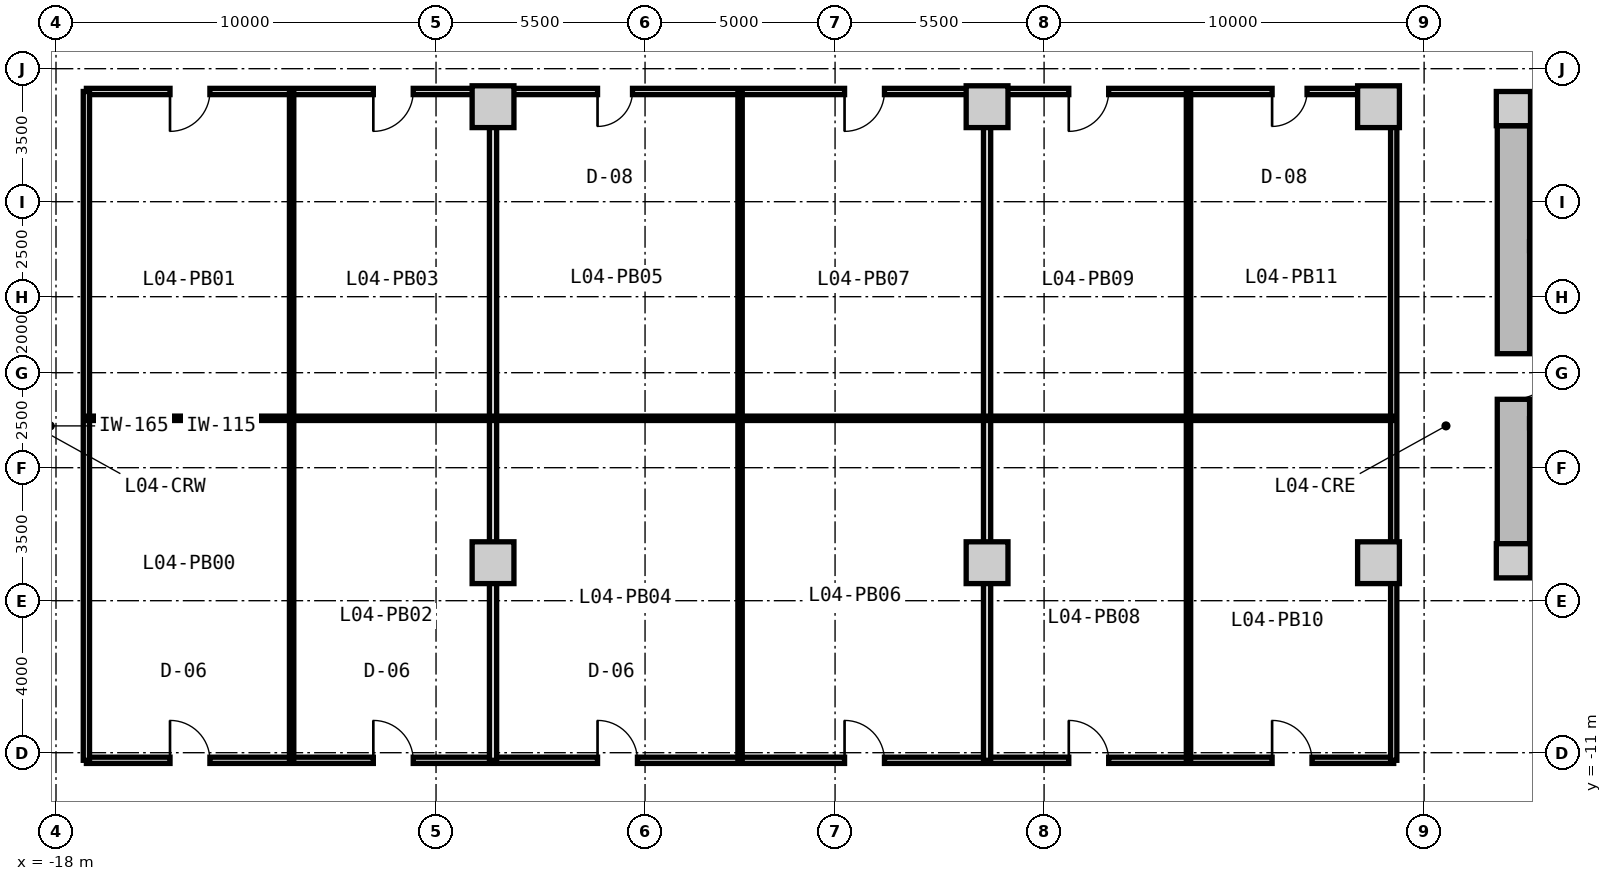
"""IFC4 building model, lengths in metres.
Left out: names, types, materials, properties, quantities, classifications, styles, units other than length and angle.
Written with IfcOpenShell. Run it as: python <this file> out.ifc"""

import sys

from ifc_helpers import new_model, si_unit, direction, frame, frame_2d, origin, origin_2d, place, context, subcontext, project, spatial, rectangle, extrude, source, transform, mapped, element, fill, save


model = new_model("IFC4")
c1 = context("Model", 3, precision=1e-05, world=origin(), true_north=direction((0.0, 1.0)))
c2 = subcontext(c1, "Body", "Model", "MODEL_VIEW")
j1 = project(units=[si_unit("LENGTHUNIT", "METRE"), si_unit("PLANEANGLEUNIT", "RADIAN")], contexts=[c1])
p1 = place(None, origin())
s1 = spatial("IfcSite", under=j1, at=p1, CompositionType="ELEMENT")
p2 = place(p1, origin())
s2 = spatial("IfcBuilding", under=s1, at=p2, CompositionType="ELEMENT")
p3 = place(p2, frame((0.0, 0.0, 16.8)))
s3 = spatial("IfcBuildingStorey", under=s2, at=p3, CompositionType="ELEMENT", Elevation=16.8)
m1 = source(origin(), c2, "Body", "SweptSolid", [
    extrude(rectangle(XDim=0.9, YDim=0.9, at=origin_2d()), origin(), (0.0, 0.0, 1.0), 4.8),
])
for number, where, z_axis, x_axis in (
    (1, (20.35, -5.95, 0.0), (0.0, 0.0, 1.0), (1.0, 0.0, 0.0)),
    (2, (20.35, 5.95, 0.0), (0.0, 0.0, 1.0), (1.0, 0.0, 0.0)),
):
    element("IfcColumn", number, at=place(p3, frame(where, z_axis=z_axis, x_axis=x_axis)), inside=s3, PredefinedType="COLUMN", context=c2, shape_type="MappedRepresentation", body=[
        mapped(m1, transform((0.0, 0.0, 0.0), x_axis=(1.0, 0.0, 0.0), y_axis=(0.0, 1.0, 0.0), z_axis=(0.0, 0.0, 1.0), scale=1.0)),
    ])
m2 = source(origin(), c2, "Body", "SweptSolid", [
    extrude(rectangle(XDim=14.4, YDim=0.85, at=frame_2d((7.2, 0.0))), origin(), (0.0, 0.0, 1.0), 4.38),
])
for number, where, z_axis, x_axis in (
    (3, (20.8, 5.95, 0.0), (0.0, 0.0, 1.0), (1.0, 0.0, 0.0)),
    (4, (35.2, -5.95, 0.0), (0.0, 0.0, 1.0), (-1.0, 0.0, 0.0)),
):
    element("IfcWall", number, at=place(p3, frame(where, z_axis=z_axis, x_axis=x_axis)), inside=s3, PredefinedType="SHEAR", context=c2, shape_type="MappedRepresentation", body=[
        mapped(m2, transform((0.0, 0.0, 0.0), x_axis=(1.0, 0.0, 0.0), y_axis=(0.0, 1.0, 0.0), z_axis=(0.0, 0.0, 1.0), scale=1.0)),
    ])
m3 = source(origin(), c2, "Body", "SweptSolid", [
    extrude(rectangle(XDim=11.0, YDim=0.85, at=frame_2d((5.5, 0.0))), origin(), (0.0, 0.0, 1.0), 4.38),
])
p4 = place(p3, frame((20.35, -5.5, 0.0), z_axis=(0.0, 0.0, 1.0), x_axis=(0.0, 1.0, 0.0)))
e5 = element("IfcWall", 5, at=p4, inside=s3, PredefinedType="SHEAR", context=c2, shape_type="MappedRepresentation", body=[
    mapped(m3, transform((0.0, 0.0, 0.0), x_axis=(1.0, 0.0, 0.0), y_axis=(0.0, 1.0, 0.0), z_axis=(0.0, 0.0, 1.0), scale=1.0)),
])
p5 = place(p4, frame((3.8, 0.0, 0.0)))
e6 = element("IfcOpeningElement", 6, at=p5, cuts=e5, PredefinedType="OPENING", context=c2, shape_type="SweptSolid", body=[
    extrude(rectangle(XDim=1.2, YDim=2.15, at=frame_2d((0.6, 1.075))), frame((0.0, 0.435, 0.0), z_axis=(0.0, -1.0, 0.0), x_axis=(1.0, 0.0, 0.0)), (0.0, 0.0, 1.0), 0.87),
])
m4 = source(origin(), c2, "Body", "SweptSolid", [
    extrude(rectangle(XDim=1.1, YDim=1.1, at=origin_2d()), origin(), (0.0, 0.0, 1.0), 4.38),
])
for number, where, z_axis, x_axis in (
    (7, (-6.5, -6.0, 0.0), (0.0, 0.0, 1.0), (1.0, 0.0, 0.0)),
    (8, (-6.5, 6.0, 0.0), (0.0, 0.0, 1.0), (1.0, 0.0, 0.0)),
    (9, (6.5, -6.0, 0.0), (0.0, 0.0, 1.0), (1.0, 0.0, 0.0)),
    (10, (6.5, 6.0, 0.0), (0.0, 0.0, 1.0), (1.0, 0.0, 0.0)),
    (11, (16.8, -6.0, 0.0), (0.0, 0.0, 1.0), (1.0, 0.0, 0.0)),
    (12, (16.8, 6.0, 0.0), (0.0, 0.0, 1.0), (1.0, 0.0, 0.0)),
):
    element("IfcColumn", number, at=place(p3, frame(where, z_axis=z_axis, x_axis=x_axis)), inside=s3, PredefinedType="COLUMN", context=c2, shape_type="MappedRepresentation", body=[
        mapped(m4, transform((0.0, 0.0, 0.0), x_axis=(1.0, 0.0, 0.0), y_axis=(0.0, 1.0, 0.0), z_axis=(0.0, 0.0, 1.0), scale=1.0)),
    ])
m5 = source(origin(), c2, "Body", "SweptSolid", [
    extrude(rectangle(XDim=7.765, YDim=0.24, at=frame_2d((3.883, 0.0))), origin(), (0.0, 0.0, 1.0), 4.38),
])
p6 = place(p3, frame((20.775, 2.33, 0.0), z_axis=(0.0, 0.0, 1.0), x_axis=(1.0, 0.0, 0.0)))
e13 = element("IfcWall", 13, at=p6, inside=s3, PredefinedType="PARTITIONING", context=c2, shape_type="MappedRepresentation", body=[
    mapped(m5, transform((0.0, 0.0, 0.0), x_axis=(1.0, 0.0, 0.0), y_axis=(0.0, 1.0, 0.0), z_axis=(0.0, 0.0, 1.0), scale=1.0)),
])
p7 = place(p3, frame((20.775, -2.33, 0.0), z_axis=(0.0, 0.0, 1.0), x_axis=(1.0, 0.0, 0.0)))
e14 = element("IfcWall", 14, at=p7, inside=s3, PredefinedType="PARTITIONING", context=c2, shape_type="MappedRepresentation", body=[
    mapped(m5, transform((0.0, 0.0, 0.0), x_axis=(1.0, 0.0, 0.0), y_axis=(0.0, 1.0, 0.0), z_axis=(0.0, 0.0, 1.0), scale=1.0)),
])
p8 = place(p7, frame((0.885, 0.0, 0.0)))
e15 = element("IfcOpeningElement", 15, at=p8, cuts=e14, PredefinedType="OPENING", context=c2, shape_type="SweptSolid", body=[
    extrude(rectangle(XDim=1.1, YDim=2.15, at=frame_2d((0.55, 1.075))), frame((0.0, 0.13, 0.0), z_axis=(0.0, -1.0, 0.0), x_axis=(1.0, 0.0, 0.0)), (0.0, 0.0, 1.0), 0.26),
])
m6 = source(origin(), c2, "Body", "SweptSolid", [
    extrude(rectangle(XDim=7.62, YDim=0.24, at=frame_2d((3.81, 0.0))), origin(), (0.0, 0.0, 1.0), 4.365),
])
p9 = place(p3, frame((20.8, -0.13, 0.0), z_axis=(0.0, 0.0, 1.0), x_axis=(1.0, 0.0, 0.0)))
e16 = element("IfcWall", 16, at=p9, inside=s3, PredefinedType="PARTITIONING", context=c2, shape_type="MappedRepresentation", body=[
    mapped(m6, transform((0.0, 0.0, 0.0), x_axis=(1.0, 0.0, 0.0), y_axis=(0.0, 1.0, 0.0), z_axis=(0.0, 0.0, 1.0), scale=1.0)),
])
p10 = place(p9, frame((6.22, 0.0, 0.0)))
e17 = element("IfcOpeningElement", 17, at=p10, cuts=e16, PredefinedType="OPENING", context=c2, shape_type="SweptSolid", body=[
    extrude(rectangle(XDim=1.0, YDim=2.1, at=frame_2d((0.5, 1.05))), frame((0.0, 0.13, 0.0), z_axis=(0.0, -1.0, 0.0), x_axis=(1.0, 0.0, 0.0)), (0.0, 0.0, 1.0), 0.26),
])
p11 = place(p9, frame((0.85, 0.0, 0.0)))
e18 = element("IfcOpeningElement", 18, at=p11, cuts=e16, PredefinedType="OPENING", context=c2, shape_type="SweptSolid", body=[
    extrude(rectangle(XDim=1.1, YDim=2.2, at=frame_2d((0.55, 1.1))), frame((0.0, 0.13, 0.0), z_axis=(0.0, -1.0, 0.0), x_axis=(1.0, 0.0, 0.0)), (0.0, 0.0, 1.0), 0.26),
])
p12 = place(p9, frame((3.85, 0.0, 0.0)))
e19 = element("IfcOpeningElement", 19, at=p12, cuts=e16, PredefinedType="OPENING", context=c2, shape_type="SweptSolid", body=[
    extrude(rectangle(XDim=1.1, YDim=2.2, at=frame_2d((0.55, 1.1))), frame((0.0, 0.13, 0.0), z_axis=(0.0, -1.0, 0.0), x_axis=(1.0, 0.0, 0.0)), (0.0, 0.0, 1.0), 0.26),
])
m7 = source(origin(), c2, "Body", "SweptSolid", [
    extrude(rectangle(XDim=34.4, YDim=0.165, at=frame_2d((17.2, 0.0))), origin(), (0.0, 0.0, 1.0), 4.365),
])
p13 = place(p3, frame((-17.2, -11.2, 0.0), z_axis=(0.0, 0.0, 1.0), x_axis=(1.0, 0.0, 0.0)))
e20 = element("IfcWall", 20, at=p13, inside=s3, PredefinedType="PARTITIONING", context=c2, shape_type="MappedRepresentation", body=[
    mapped(m7, transform((0.0, 0.0, 0.0), x_axis=(1.0, 0.0, 0.0), y_axis=(0.0, 1.0, 0.0), z_axis=(0.0, 0.0, 1.0), scale=1.0)),
])
p14 = place(p13, frame((2.2, 0.0, 0.0)))
e21 = element("IfcOpeningElement", 21, at=p14, cuts=e20, PredefinedType="OPENING", context=c2, shape_type="SweptSolid", body=[
    extrude(rectangle(XDim=1.05, YDim=2.15, at=frame_2d((0.525, 1.075))), frame((0.0, 0.093, 0.0), z_axis=(0.0, -1.0, 0.0), x_axis=(1.0, 0.0, 0.0)), (0.0, 0.0, 1.0), 0.185),
])
p15 = place(p13, frame((7.55, 0.0, 0.0)))
e22 = element("IfcOpeningElement", 22, at=p15, cuts=e20, PredefinedType="OPENING", context=c2, shape_type="SweptSolid", body=[
    extrude(rectangle(XDim=1.05, YDim=2.15, at=frame_2d((0.525, 1.075))), frame((0.0, 0.093, 0.0), z_axis=(0.0, -1.0, 0.0), x_axis=(1.0, 0.0, 0.0)), (0.0, 0.0, 1.0), 0.185),
])
p16 = place(p13, frame((13.45, 0.0, 0.0)))
e23 = element("IfcOpeningElement", 23, at=p16, cuts=e20, PredefinedType="OPENING", context=c2, shape_type="SweptSolid", body=[
    extrude(rectangle(XDim=1.05, YDim=2.15, at=frame_2d((0.525, 1.075))), frame((0.0, 0.093, 0.0), z_axis=(0.0, -1.0, 0.0), x_axis=(1.0, 0.0, 0.0)), (0.0, 0.0, 1.0), 0.185),
])
p17 = place(p13, frame((19.95, 0.0, 0.0)))
e24 = element("IfcOpeningElement", 24, at=p17, cuts=e20, PredefinedType="OPENING", context=c2, shape_type="SweptSolid", body=[
    extrude(rectangle(XDim=1.05, YDim=2.15, at=frame_2d((0.525, 1.075))), frame((0.0, 0.093, 0.0), z_axis=(0.0, -1.0, 0.0), x_axis=(1.0, 0.0, 0.0)), (0.0, 0.0, 1.0), 0.185),
])
p18 = place(p13, frame((25.85, 0.0, 0.0)))
e25 = element("IfcOpeningElement", 25, at=p18, cuts=e20, PredefinedType="OPENING", context=c2, shape_type="SweptSolid", body=[
    extrude(rectangle(XDim=1.05, YDim=2.15, at=frame_2d((0.525, 1.075))), frame((0.0, 0.093, 0.0), z_axis=(0.0, -1.0, 0.0), x_axis=(1.0, 0.0, 0.0)), (0.0, 0.0, 1.0), 0.185),
])
p19 = place(p13, frame((31.2, 0.0, 0.0)))
e26 = element("IfcOpeningElement", 26, at=p19, cuts=e20, PredefinedType="OPENING", context=c2, shape_type="SweptSolid", body=[
    extrude(rectangle(XDim=1.05, YDim=2.15, at=frame_2d((0.525, 1.075))), frame((0.0, 0.093, 0.0), z_axis=(0.0, -1.0, 0.0), x_axis=(1.0, 0.0, 0.0)), (0.0, 0.0, 1.0), 0.185),
])
m8 = source(origin(), c2, "Body", "SweptSolid", [
    extrude(rectangle(XDim=34.4, YDim=0.165, at=frame_2d((17.2, 0.0))), origin(), (0.0, 0.0, 1.0), 2.765),
])
p20 = place(p3, frame((-17.2, 6.4, 0.0), z_axis=(0.0, 0.0, 1.0), x_axis=(1.0, 0.0, 0.0)))
e27 = element("IfcWall", 27, at=p20, inside=s3, PredefinedType="PARTITIONING", context=c2, shape_type="MappedRepresentation", body=[
    mapped(m8, transform((0.0, 0.0, 0.0), x_axis=(1.0, 0.0, 0.0), y_axis=(0.0, 1.0, 0.0), z_axis=(0.0, 0.0, 1.0), scale=1.0)),
])
p21 = place(p20, frame((2.2, 0.0, 0.0)))
e28 = element("IfcOpeningElement", 28, at=p21, cuts=e27, PredefinedType="OPENING", context=c2, shape_type="SweptSolid", body=[
    extrude(rectangle(XDim=1.05, YDim=2.15, at=frame_2d((0.525, 1.075))), frame((0.0, 0.093, 0.0), z_axis=(0.0, -1.0, 0.0), x_axis=(1.0, 0.0, 0.0)), (0.0, 0.0, 1.0), 0.185),
])
p22 = place(p20, frame((7.55, 0.0, 0.0)))
e29 = element("IfcOpeningElement", 29, at=p22, cuts=e27, PredefinedType="OPENING", context=c2, shape_type="SweptSolid", body=[
    extrude(rectangle(XDim=1.05, YDim=2.15, at=frame_2d((0.525, 1.075))), frame((0.0, 0.093, 0.0), z_axis=(0.0, -1.0, 0.0), x_axis=(1.0, 0.0, 0.0)), (0.0, 0.0, 1.0), 0.185),
])
p23 = place(p20, frame((13.45, 0.0, 0.0)))
e30 = element("IfcOpeningElement", 30, at=p23, cuts=e27, PredefinedType="OPENING", context=c2, shape_type="SweptSolid", body=[
    extrude(rectangle(XDim=0.92, YDim=2.1, at=frame_2d((0.46, 1.05))), frame((0.0, 0.093, 0.0), z_axis=(0.0, -1.0, 0.0), x_axis=(1.0, 0.0, 0.0)), (0.0, 0.0, 1.0), 0.185),
])
p24 = place(p20, frame((19.95, 0.0, 0.0)))
e31 = element("IfcOpeningElement", 31, at=p24, cuts=e27, PredefinedType="OPENING", context=c2, shape_type="SweptSolid", body=[
    extrude(rectangle(XDim=1.05, YDim=2.15, at=frame_2d((0.525, 1.075))), frame((0.0, 0.093, 0.0), z_axis=(0.0, -1.0, 0.0), x_axis=(1.0, 0.0, 0.0)), (0.0, 0.0, 1.0), 0.185),
])
p25 = place(p20, frame((25.85, 0.0, 0.0)))
e32 = element("IfcOpeningElement", 32, at=p25, cuts=e27, PredefinedType="OPENING", context=c2, shape_type="SweptSolid", body=[
    extrude(rectangle(XDim=1.05, YDim=2.15, at=frame_2d((0.525, 1.075))), frame((0.0, 0.093, 0.0), z_axis=(0.0, -1.0, 0.0), x_axis=(1.0, 0.0, 0.0)), (0.0, 0.0, 1.0), 0.185),
])
p26 = place(p20, frame((31.2, 0.0, 0.0)))
e33 = element("IfcOpeningElement", 33, at=p26, cuts=e27, PredefinedType="OPENING", context=c2, shape_type="SweptSolid", body=[
    extrude(rectangle(XDim=0.92, YDim=2.1, at=frame_2d((0.46, 1.05))), frame((0.0, 0.093, 0.0), z_axis=(0.0, -1.0, 0.0), x_axis=(1.0, 0.0, 0.0)), (0.0, 0.0, 1.0), 0.185),
])
m9 = source(origin(), c2, "Body", "SweptSolid", [
    extrude(rectangle(XDim=17.6, YDim=0.165, at=frame_2d((8.8, 0.0))), origin(), (0.0, 0.0, 1.0), 4.365),
])
p27 = place(p3, frame((-17.2, -11.2, 0.0), z_axis=(0.0, 0.0, 1.0), x_axis=(0.0, 1.0, 0.0)))
e34 = element("IfcWall", 34, at=p27, inside=s3, PredefinedType="PARTITIONING", context=c2, shape_type="MappedRepresentation", body=[
    mapped(m9, transform((0.0, 0.0, 0.0), x_axis=(1.0, 0.0, 0.0), y_axis=(0.0, 1.0, 0.0), z_axis=(0.0, 0.0, 1.0), scale=1.0)),
])
m10 = source(origin(), c2, "Body", "SweptSolid", [
    extrude(rectangle(XDim=17.6, YDim=0.165, at=frame_2d((8.8, 0.0))), origin(), (0.0, 0.0, 1.0), 2.765),
])
p28 = place(p3, frame((17.2, -11.2, 0.0), z_axis=(0.0, 0.0, 1.0), x_axis=(0.0, 1.0, 0.0)))
e35 = element("IfcWall", 35, at=p28, inside=s3, PredefinedType="PARTITIONING", context=c2, shape_type="MappedRepresentation", body=[
    mapped(m10, transform((0.0, 0.0, 0.0), x_axis=(1.0, 0.0, 0.0), y_axis=(0.0, 1.0, 0.0), z_axis=(0.0, 0.0, 1.0), scale=1.0)),
])
m11 = source(origin(), c2, "Body", "SweptSolid", [
    extrude(rectangle(XDim=17.6, YDim=0.19, at=frame_2d((8.8, 0.0))), origin(), (0.0, 0.0, 1.0), 2.765),
])
for number, where, z_axis, x_axis in (
    (36, (-6.5, -11.2, 0.0), (0.0, 0.0, 1.0), (0.0, 1.0, 0.0)),
    (37, (6.5, -11.2, 0.0), (0.0, 0.0, 1.0), (0.0, 1.0, 0.0)),
):
    element("IfcWall", number, at=place(p3, frame(where, z_axis=z_axis, x_axis=x_axis)), inside=s3, PredefinedType="PARTITIONING", context=c2, shape_type="MappedRepresentation", body=[
        mapped(m11, transform((0.0, 0.0, 0.0), x_axis=(1.0, 0.0, 0.0), y_axis=(0.0, 1.0, 0.0), z_axis=(0.0, 0.0, 1.0), scale=1.0)),
    ])
m12 = source(origin(), c2, "Body", "SweptSolid", [
    extrude(rectangle(XDim=17.6, YDim=0.115, at=frame_2d((8.8, 0.0))), origin(), (0.0, 0.0, 1.0), 4.365),
])
for number, where, z_axis, x_axis in (
    (38, (-11.8, -11.2, 0.0), (0.0, 0.0, 1.0), (0.0, 1.0, 0.0)),
    (39, (0.0, -11.2, 0.0), (0.0, 0.0, 1.0), (0.0, 1.0, 0.0)),
    (40, (11.8, -11.2, 0.0), (0.0, 0.0, 1.0), (0.0, 1.0, 0.0)),
):
    element("IfcWall", number, at=place(p3, frame(where, z_axis=z_axis, x_axis=x_axis)), inside=s3, PredefinedType="PARTITIONING", context=c2, shape_type="MappedRepresentation", body=[
        mapped(m12, transform((0.0, 0.0, 0.0), x_axis=(1.0, 0.0, 0.0), y_axis=(0.0, 1.0, 0.0), z_axis=(0.0, 0.0, 1.0), scale=1.0)),
    ])
m13 = source(origin(), c2, "Body", "SweptSolid", [
    extrude(rectangle(XDim=34.4, YDim=0.115, at=frame_2d((17.2, 0.0))), origin(), (0.0, 0.0, 1.0), 2.765),
])
p29 = place(p3, frame((-17.2, -2.2, 0.0), z_axis=(0.0, 0.0, 1.0), x_axis=(1.0, 0.0, 0.0)))
e41 = element("IfcWall", 41, at=p29, inside=s3, PredefinedType="PARTITIONING", context=c2, shape_type="MappedRepresentation", body=[
    mapped(m13, transform((0.0, 0.0, 0.0), x_axis=(1.0, 0.0, 0.0), y_axis=(0.0, 1.0, 0.0), z_axis=(0.0, 0.0, 1.0), scale=1.0)),
])
m14 = source(origin(), c2, "Body", "SweptSolid", [
    extrude(rectangle(XDim=1.2, YDim=2.15, at=frame_2d((0.6, 1.075))), frame((0.0, 0.025, 0.0), z_axis=(0.0, -1.0, 0.0), x_axis=(1.0, 0.0, 0.0)), (0.0, 0.0, 1.0), 0.05),
])
p30 = place(p5, frame((1.2, 0.0, 0.0), z_axis=(0.0, 0.0, 1.0), x_axis=(-1.0, 0.0, 0.0)))
e42 = element("IfcDoor", 42, at=p30, inside=s3, OperationType="SINGLE_SWING_LEFT", PredefinedType="DOOR", context=c2, shape_type="MappedRepresentation", body=[
    mapped(m14, transform((0.0, 0.0, 0.0), x_axis=(1.0, 0.0, 0.0), y_axis=(0.0, 1.0, 0.0), z_axis=(0.0, 0.0, 1.0), scale=1.0)),
])
fill(e6, e42)
m15 = source(origin(), c2, "Body", "SweptSolid", [
    extrude(rectangle(XDim=1.05, YDim=2.15, at=frame_2d((0.525, 1.075))), frame((0.0, 0.025, 0.0), z_axis=(0.0, -1.0, 0.0), x_axis=(1.0, 0.0, 0.0)), (0.0, 0.0, 1.0), 0.05),
])
p31 = place(p14, origin())
e43 = element("IfcDoor", 43, at=p31, inside=s3, OperationType="SINGLE_SWING_LEFT", PredefinedType="DOOR", context=c2, shape_type="MappedRepresentation", body=[
    mapped(m15, transform((0.0, 0.0, 0.0), x_axis=(1.0, 0.0, 0.0), y_axis=(0.0, 1.0, 0.0), z_axis=(0.0, 0.0, 1.0), scale=1.0)),
])
fill(e21, e43)
p32 = place(p21, frame((1.05, 0.0, 0.0), z_axis=(0.0, 0.0, 1.0), x_axis=(-1.0, 0.0, 0.0)))
e44 = element("IfcDoor", 44, at=p32, inside=s3, OperationType="SINGLE_SWING_RIGHT", PredefinedType="DOOR", context=c2, shape_type="MappedRepresentation", body=[
    mapped(m15, transform((0.0, 0.0, 0.0), x_axis=(1.0, 0.0, 0.0), y_axis=(0.0, 1.0, 0.0), z_axis=(0.0, 0.0, 1.0), scale=1.0)),
])
fill(e28, e44)
p33 = place(p15, origin())
e45 = element("IfcDoor", 45, at=p33, inside=s3, OperationType="SINGLE_SWING_LEFT", PredefinedType="DOOR", context=c2, shape_type="MappedRepresentation", body=[
    mapped(m15, transform((0.0, 0.0, 0.0), x_axis=(1.0, 0.0, 0.0), y_axis=(0.0, 1.0, 0.0), z_axis=(0.0, 0.0, 1.0), scale=1.0)),
])
fill(e22, e45)
p34 = place(p22, frame((1.05, 0.0, 0.0), z_axis=(0.0, 0.0, 1.0), x_axis=(-1.0, 0.0, 0.0)))
e46 = element("IfcDoor", 46, at=p34, inside=s3, OperationType="SINGLE_SWING_RIGHT", PredefinedType="DOOR", context=c2, shape_type="MappedRepresentation", body=[
    mapped(m15, transform((0.0, 0.0, 0.0), x_axis=(1.0, 0.0, 0.0), y_axis=(0.0, 1.0, 0.0), z_axis=(0.0, 0.0, 1.0), scale=1.0)),
])
fill(e29, e46)
p35 = place(p16, origin())
e47 = element("IfcDoor", 47, at=p35, inside=s3, OperationType="SINGLE_SWING_LEFT", PredefinedType="DOOR", context=c2, shape_type="MappedRepresentation", body=[
    mapped(m15, transform((0.0, 0.0, 0.0), x_axis=(1.0, 0.0, 0.0), y_axis=(0.0, 1.0, 0.0), z_axis=(0.0, 0.0, 1.0), scale=1.0)),
])
fill(e23, e47)
m16 = source(origin(), c2, "Body", "SweptSolid", [
    extrude(rectangle(XDim=0.92, YDim=2.1, at=frame_2d((0.46, 1.05))), frame((0.0, 0.025, 0.0), z_axis=(0.0, -1.0, 0.0), x_axis=(1.0, 0.0, 0.0)), (0.0, 0.0, 1.0), 0.05),
])
p36 = place(p23, frame((0.92, 0.0, 0.0), z_axis=(0.0, 0.0, 1.0), x_axis=(-1.0, 0.0, 0.0)))
e48 = element("IfcDoor", 48, at=p36, inside=s3, OperationType="SINGLE_SWING_RIGHT", PredefinedType="DOOR", context=c2, shape_type="MappedRepresentation", body=[
    mapped(m16, transform((0.0, 0.0, 0.0), x_axis=(1.0, 0.0, 0.0), y_axis=(0.0, 1.0, 0.0), z_axis=(0.0, 0.0, 1.0), scale=1.0)),
])
fill(e30, e48)
p37 = place(p17, origin())
e49 = element("IfcDoor", 49, at=p37, inside=s3, OperationType="SINGLE_SWING_LEFT", PredefinedType="DOOR", context=c2, shape_type="MappedRepresentation", body=[
    mapped(m15, transform((0.0, 0.0, 0.0), x_axis=(1.0, 0.0, 0.0), y_axis=(0.0, 1.0, 0.0), z_axis=(0.0, 0.0, 1.0), scale=1.0)),
])
fill(e24, e49)
p38 = place(p24, frame((1.05, 0.0, 0.0), z_axis=(0.0, 0.0, 1.0), x_axis=(-1.0, 0.0, 0.0)))
e50 = element("IfcDoor", 50, at=p38, inside=s3, OperationType="SINGLE_SWING_RIGHT", PredefinedType="DOOR", context=c2, shape_type="MappedRepresentation", body=[
    mapped(m15, transform((0.0, 0.0, 0.0), x_axis=(1.0, 0.0, 0.0), y_axis=(0.0, 1.0, 0.0), z_axis=(0.0, 0.0, 1.0), scale=1.0)),
])
fill(e31, e50)
p39 = place(p18, origin())
e51 = element("IfcDoor", 51, at=p39, inside=s3, OperationType="SINGLE_SWING_LEFT", PredefinedType="DOOR", context=c2, shape_type="MappedRepresentation", body=[
    mapped(m15, transform((0.0, 0.0, 0.0), x_axis=(1.0, 0.0, 0.0), y_axis=(0.0, 1.0, 0.0), z_axis=(0.0, 0.0, 1.0), scale=1.0)),
])
fill(e25, e51)
p40 = place(p25, frame((1.05, 0.0, 0.0), z_axis=(0.0, 0.0, 1.0), x_axis=(-1.0, 0.0, 0.0)))
e52 = element("IfcDoor", 52, at=p40, inside=s3, OperationType="SINGLE_SWING_RIGHT", PredefinedType="DOOR", context=c2, shape_type="MappedRepresentation", body=[
    mapped(m15, transform((0.0, 0.0, 0.0), x_axis=(1.0, 0.0, 0.0), y_axis=(0.0, 1.0, 0.0), z_axis=(0.0, 0.0, 1.0), scale=1.0)),
])
fill(e32, e52)
p41 = place(p19, origin())
e53 = element("IfcDoor", 53, at=p41, inside=s3, OperationType="SINGLE_SWING_LEFT", PredefinedType="DOOR", context=c2, shape_type="MappedRepresentation", body=[
    mapped(m15, transform((0.0, 0.0, 0.0), x_axis=(1.0, 0.0, 0.0), y_axis=(0.0, 1.0, 0.0), z_axis=(0.0, 0.0, 1.0), scale=1.0)),
])
fill(e26, e53)
p42 = place(p26, frame((0.92, 0.0, 0.0), z_axis=(0.0, 0.0, 1.0), x_axis=(-1.0, 0.0, 0.0)))
e54 = element("IfcDoor", 54, at=p42, inside=s3, OperationType="SINGLE_SWING_RIGHT", PredefinedType="DOOR", context=c2, shape_type="MappedRepresentation", body=[
    mapped(m16, transform((0.0, 0.0, 0.0), x_axis=(1.0, 0.0, 0.0), y_axis=(0.0, 1.0, 0.0), z_axis=(0.0, 0.0, 1.0), scale=1.0)),
])
fill(e33, e54)
save(model, sys.argv[1])
